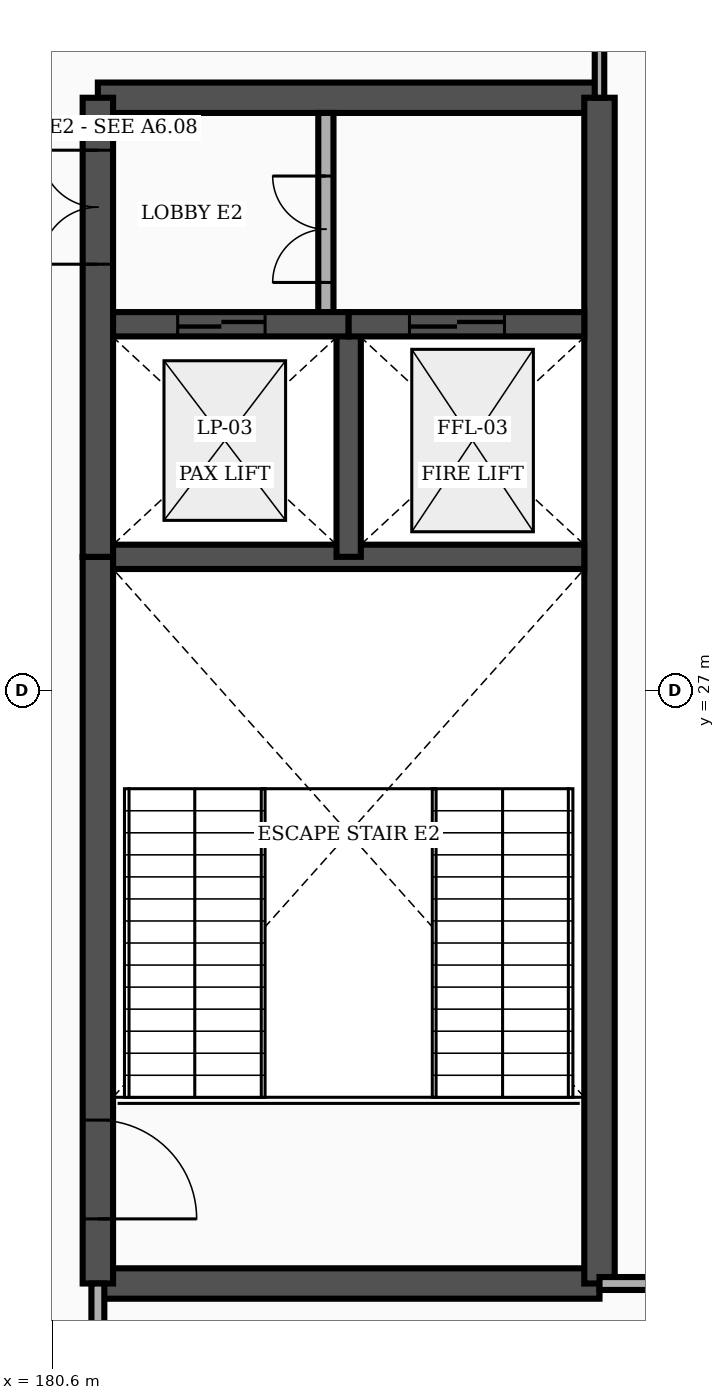
"""IFC4 building model, lengths in metres.
Left out: names, types, materials, properties, quantities, classifications, styles, units other than length and angle.
Written with IfcOpenShell. Run it as: python <this file> out.ifc"""

import sys

from ifc_helpers import new_model, si_unit, direction, frame, frame_2d, origin, place, context, subcontext, project, spatial, rectangle, extrude, element, fill, save


model = new_model("IFC4")
c1 = context("Model", 3, precision=1e-05, world=origin(), true_north=direction((0.0, 1.0)))
c2 = subcontext(c1, "Body", "Model", "MODEL_VIEW")
j1 = project(units=[si_unit("LENGTHUNIT", "METRE"), si_unit("PLANEANGLEUNIT", "RADIAN")], contexts=[c1])
p1 = place(None, origin())
s1 = spatial("IfcSite", under=j1, at=p1, CompositionType="ELEMENT")
p2 = place(p1, origin())
s2 = spatial("IfcBuilding", under=s1, at=p2, CompositionType="ELEMENT")
p3 = place(p2, frame((0.0, 0.0, 16.8)))
s3 = spatial("IfcBuildingStorey", under=s2, at=p3, CompositionType="ELEMENT", Elevation=16.8)
for number, where, z_axis, x_axis in (
    (1, (181.2, 19.2, 0.0), (0.0, 0.0, 1.0), (1.0, 0.0, 0.0)),
    (2, (181.2, 34.8, 0.0), (0.0, 0.0, 1.0), (1.0, 0.0, 0.0)),
):
    element("IfcWall", number, at=place(p3, frame(where, z_axis=z_axis, x_axis=x_axis)), inside=s3, PredefinedType="SHEAR", context=c2, shape_type="SweptSolid", body=[
        extrude(rectangle(XDim=6.6, YDim=0.4, at=frame_2d((3.3, 0.0))), origin(), (0.0, 0.0, 1.0), 4.555),
    ])
p4 = place(p3, frame((187.8, 19.2, 0.0), z_axis=(0.0, 0.0, 1.0), x_axis=(0.0, 1.0, 0.0)))
e3 = element("IfcWall", 3, at=p4, inside=s3, PredefinedType="SHEAR", context=c2, shape_type="SweptSolid", body=[
    extrude(rectangle(XDim=15.6, YDim=0.4, at=frame_2d((7.8, 0.0))), origin(), (0.0, 0.0, 1.0), 4.555),
])
p5 = place(p3, frame((181.2, 19.2, 0.0), z_axis=(0.0, 0.0, 1.0), x_axis=(0.0, 1.0, 0.0)))
e4 = element("IfcWall", 4, at=p5, inside=s3, PredefinedType="SHEAR", context=c2, shape_type="SweptSolid", body=[
    extrude(rectangle(XDim=9.56, YDim=0.4, at=frame_2d((4.78, 0.0))), origin(), (0.0, 0.0, 1.0), 4.555),
])
p6 = place(p5, frame((0.85, 0.0, 0.0)))
e5 = element("IfcOpeningElement", 5, at=p6, cuts=e4, PredefinedType="OPENING", context=c2, shape_type="SweptSolid", body=[
    extrude(rectangle(XDim=1.3, YDim=2.2, at=frame_2d((0.65, 1.1))), frame((0.0, 0.212, 0.0), z_axis=(0.0, -1.0, 0.0), x_axis=(1.0, 0.0, 0.0)), (0.0, 0.0, 1.0), 0.424),
])
p7 = place(p3, frame((181.2, 28.76, 0.0), z_axis=(0.0, 0.0, 1.0), x_axis=(0.0, 1.0, 0.0)))
e6 = element("IfcWall", 6, at=p7, inside=s3, PredefinedType="SHEAR", context=c2, shape_type="SweptSolid", body=[
    extrude(rectangle(XDim=6.04, YDim=0.4, at=frame_2d((3.02, 0.0))), origin(), (0.0, 0.0, 1.0), 4.555),
])
p8 = place(p7, frame((3.85, 0.0, 0.0)))
e7 = element("IfcOpeningElement", 7, at=p8, cuts=e6, PredefinedType="OPENING", context=c2, shape_type="SweptSolid", body=[
    extrude(rectangle(XDim=1.5, YDim=2.2, at=frame_2d((0.75, 1.1))), frame((0.0, 0.212, 0.0), z_axis=(0.0, -1.0, 0.0), x_axis=(1.0, 0.0, 0.0)), (0.0, 0.0, 1.0), 0.424),
])
p9 = place(p3, frame((181.4, 28.76, 0.0), z_axis=(0.0, 0.0, 1.0), x_axis=(1.0, 0.0, 0.0)))
e8 = element("IfcWall", 8, at=p9, inside=s3, PredefinedType="SHEAR", context=c2, shape_type="SweptSolid", body=[
    extrude(rectangle(XDim=6.2, YDim=0.32, at=frame_2d((3.1, 0.0))), origin(), (0.0, 0.0, 1.0), 4.555),
])
p10 = place(p3, frame((184.5, 28.76, 0.0), z_axis=(0.0, 0.0, 1.0), x_axis=(0.0, 1.0, 0.0)))
e9 = element("IfcWall", 9, at=p10, inside=s3, PredefinedType="SHEAR", context=c2, shape_type="SweptSolid", body=[
    extrude(rectangle(XDim=3.06, YDim=0.32, at=frame_2d((1.53, 0.0))), origin(), (0.0, 0.0, 1.0), 4.555),
])
p11 = place(p3, frame((184.2, 31.82, 0.0), z_axis=(0.0, 0.0, 1.0), x_axis=(0.0, 1.0, 0.0)))
e10 = element("IfcWall", 10, at=p11, inside=s3, PredefinedType="PARTITIONING", context=c2, shape_type="SweptSolid", body=[
    extrude(rectangle(XDim=2.78, YDim=0.2, at=frame_2d((1.39, 0.0))), origin(), (0.0, 0.0, 1.0), 4.555),
])
p12 = place(p11, frame((0.55, 0.0, 0.0)))
e11 = element("IfcOpeningElement", 11, at=p12, cuts=e10, PredefinedType="OPENING", context=c2, shape_type="SweptSolid", body=[
    extrude(rectangle(XDim=1.4, YDim=2.25, at=frame_2d((0.7, 1.125))), frame((0.0, 0.112, 0.0), z_axis=(0.0, -1.0, 0.0), x_axis=(1.0, 0.0, 0.0)), (0.0, 0.0, 1.0), 0.224),
])
p13 = place(p3, frame((181.4, 31.82, 0.0), z_axis=(0.0, 0.0, 1.0), x_axis=(1.0, 0.0, 0.0)))
e12 = element("IfcWall", 12, at=p13, inside=s3, PredefinedType="SHEAR", context=c2, shape_type="SweptSolid", body=[
    extrude(rectangle(XDim=3.1, YDim=0.32, at=frame_2d((1.55, 0.0))), origin(), (0.0, 0.0, 1.0), 4.555),
])
p14 = place(p13, frame((0.85, 0.0, 0.0)))
e13 = element("IfcOpeningElement", 13, at=p14, cuts=e12, PredefinedType="OPENING", context=c2, shape_type="SweptSolid", body=[
    extrude(rectangle(XDim=1.15, YDim=2.2, at=frame_2d((0.575, 1.1))), frame((0.0, 0.172, 0.0), z_axis=(0.0, -1.0, 0.0), x_axis=(1.0, 0.0, 0.0)), (0.0, 0.0, 1.0), 0.344),
])
p15 = place(p3, frame((184.5, 31.82, 0.0), z_axis=(0.0, 0.0, 1.0), x_axis=(1.0, 0.0, 0.0)))
e14 = element("IfcWall", 14, at=p15, inside=s3, PredefinedType="SHEAR", context=c2, shape_type="SweptSolid", body=[
    extrude(rectangle(XDim=3.1, YDim=0.32, at=frame_2d((1.55, 0.0))), origin(), (0.0, 0.0, 1.0), 4.555),
])
p16 = place(p15, frame((0.8, 0.0, 0.0)))
e15 = element("IfcOpeningElement", 15, at=p16, cuts=e14, PredefinedType="OPENING", context=c2, shape_type="SweptSolid", body=[
    extrude(rectangle(XDim=1.25, YDim=2.25, at=frame_2d((0.625, 1.125))), frame((0.0, 0.172, 0.0), z_axis=(0.0, -1.0, 0.0), x_axis=(1.0, 0.0, 0.0)), (0.0, 0.0, 1.0), 0.344),
])
p17 = place(p3, frame((187.8, 34.8, 0.0), z_axis=(0.0, 0.0, 1.0), x_axis=(0.0, 1.0, 0.0)))
e16 = element("IfcWall", 16, at=p17, inside=s3, PredefinedType="PARTITIONING", context=c2, shape_type="SweptSolid", body=[
    extrude(rectangle(XDim=2.0, YDim=0.125, at=frame_2d((1.0, 0.0))), origin(), (0.0, 0.0, 1.0), 4.555),
])
p18 = place(p3, frame((187.8, 19.2, 0.0), z_axis=(0.0, 0.0, 1.0), x_axis=(1.0, 0.0, 0.0)))
e17 = element("IfcWall", 17, at=p18, inside=s3, PredefinedType="PARTITIONING", context=c2, shape_type="SweptSolid", body=[
    extrude(rectangle(XDim=10.03, YDim=0.17, at=frame_2d((5.015, 0.0))), origin(), (0.0, 0.0, 1.0), 4.555),
])
p19 = place(p3, frame((181.2, 0.17, 0.0), z_axis=(0.0, 0.0, 1.0), x_axis=(0.0, 1.0, 0.0)))
e18 = element("IfcWall", 18, at=p19, inside=s3, PredefinedType="PARTITIONING", context=c2, shape_type="SweptSolid", body=[
    extrude(rectangle(XDim=19.03, YDim=0.17, at=frame_2d((9.515, 0.0))), origin(), (0.0, 0.0, 1.0), 4.555),
])
p20 = place(p19, frame((3.3, 0.0, 0.0)))
e19 = element("IfcOpeningElement", 19, at=p20, cuts=e18, PredefinedType="OPENING", context=c2, shape_type="SweptSolid", body=[
    extrude(rectangle(XDim=1.15, YDim=2.15, at=frame_2d((0.575, 1.075))), frame((0.0, 0.097, 0.0), z_axis=(0.0, -1.0, 0.0), x_axis=(1.0, 0.0, 0.0)), (0.0, 0.0, 1.0), 0.194),
])
p21 = place(p6, frame((1.3, 0.0, 0.0), z_axis=(0.0, 0.0, 1.0), x_axis=(-1.0, 0.0, 0.0)))
e20 = element("IfcDoor", 20, at=p21, inside=s3, OperationType="SINGLE_SWING_RIGHT", PredefinedType="DOOR", context=c2, shape_type="SweptSolid", body=[
    extrude(rectangle(XDim=1.3, YDim=2.2, at=frame_2d((0.65, 1.1))), frame((0.0, 0.025, 0.0), z_axis=(0.0, -1.0, 0.0), x_axis=(1.0, 0.0, 0.0)), (0.0, 0.0, 1.0), 0.05),
])
fill(e5, e20)
p22 = place(p8, origin())
e21 = element("IfcDoor", 21, at=p22, inside=s3, OperationType="DOUBLE_DOOR_SINGLE_SWING", PredefinedType="DOOR", context=c2, shape_type="SweptSolid", body=[
    extrude(rectangle(XDim=1.5, YDim=2.2, at=frame_2d((0.75, 1.1))), frame((0.0, 0.025, 0.0), z_axis=(0.0, -1.0, 0.0), x_axis=(1.0, 0.0, 0.0)), (0.0, 0.0, 1.0), 0.05),
])
fill(e7, e21)
p23 = place(p12, origin())
e22 = element("IfcDoor", 22, at=p23, inside=s3, OperationType="DOUBLE_DOOR_SINGLE_SWING", PredefinedType="DOOR", context=c2, shape_type="SweptSolid", body=[
    extrude(rectangle(XDim=1.4, YDim=2.25, at=frame_2d((0.7, 1.125))), frame((0.0, 0.025, 0.0), z_axis=(0.0, -1.0, 0.0), x_axis=(1.0, 0.0, 0.0)), (0.0, 0.0, 1.0), 0.05),
])
fill(e11, e22)
p24 = place(p14, origin())
e23 = element("IfcDoor", 23, at=p24, inside=s3, OperationType="DOUBLE_DOOR_SLIDING", PredefinedType="DOOR", context=c2, shape_type="SweptSolid", body=[
    extrude(rectangle(XDim=1.15, YDim=2.2, at=frame_2d((0.575, 1.1))), frame((0.0, 0.025, 0.0), z_axis=(0.0, -1.0, 0.0), x_axis=(1.0, 0.0, 0.0)), (0.0, 0.0, 1.0), 0.05),
])
fill(e13, e23)
p25 = place(p16, origin())
e24 = element("IfcDoor", 24, at=p25, inside=s3, OperationType="DOUBLE_DOOR_SLIDING", PredefinedType="DOOR", context=c2, shape_type="SweptSolid", body=[
    extrude(rectangle(XDim=1.25, YDim=2.25, at=frame_2d((0.625, 1.125))), frame((0.0, 0.025, 0.0), z_axis=(0.0, -1.0, 0.0), x_axis=(1.0, 0.0, 0.0)), (0.0, 0.0, 1.0), 0.05),
])
fill(e15, e24)
save(model, sys.argv[1])
